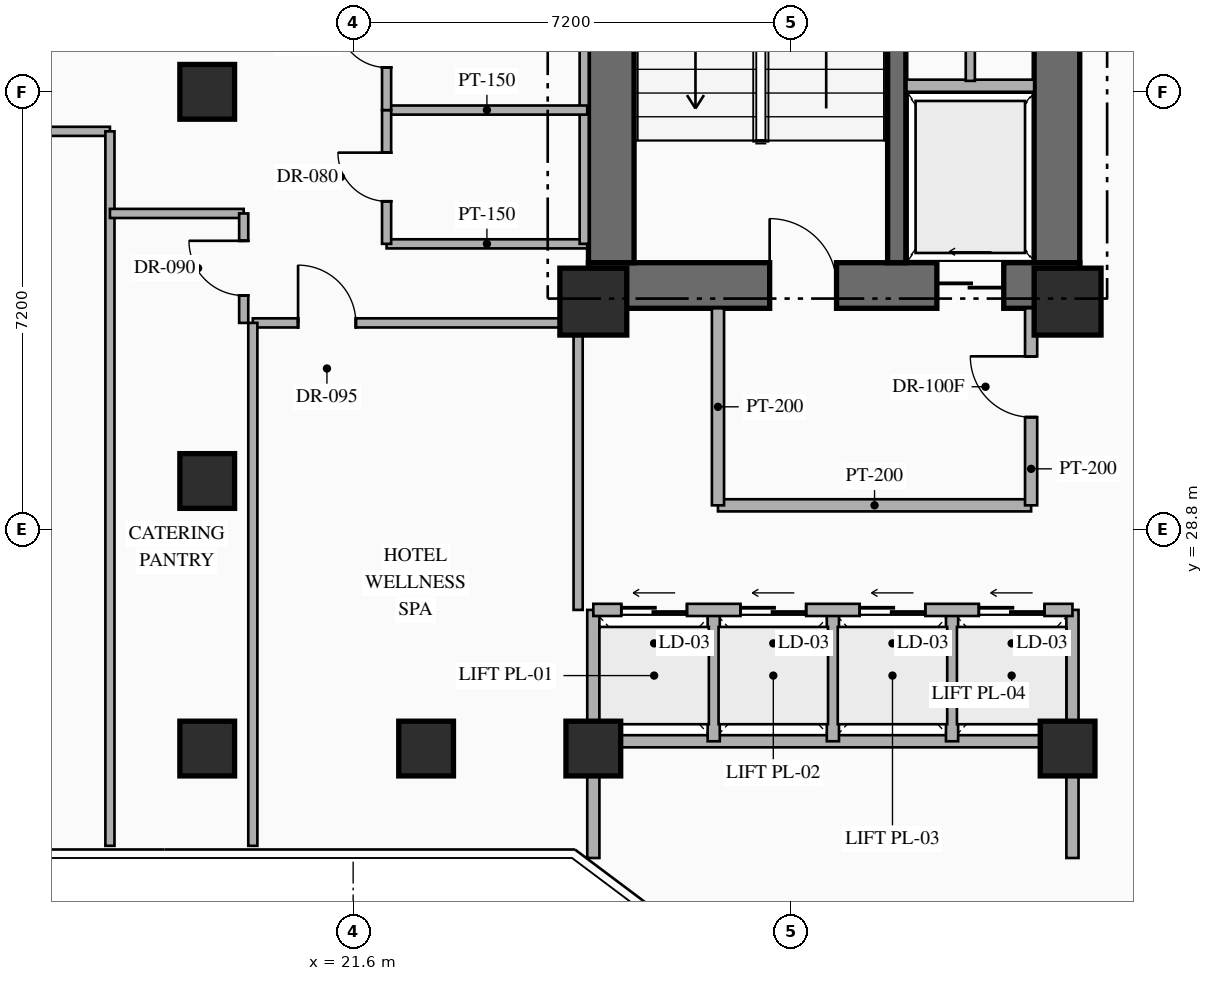
"""IFC4 building model, lengths in metres.
Left out: names, types, materials, properties, quantities, classifications, styles, units other than length and angle.
Written with IfcOpenShell. Run it as: python <this file> out.ifc"""

import sys

from ifc_helpers import new_model, si_unit, direction, frame, frame_2d, origin, origin_2d, place, context, subcontext, project, spatial, rectangle, hollow_rectangle, extrude, element, fill, save


model = new_model("IFC4")
c1 = context("Model", 3, precision=1e-05, world=origin(), true_north=direction((0.0, 1.0)))
c2 = subcontext(c1, "Body", "Model", "MODEL_VIEW")
j1 = project(units=[si_unit("LENGTHUNIT", "METRE"), si_unit("PLANEANGLEUNIT", "RADIAN")], contexts=[c1])
p1 = place(None, origin())
s1 = spatial("IfcSite", under=j1, at=p1, CompositionType="ELEMENT")
p2 = place(p1, origin())
s2 = spatial("IfcBuilding", under=s1, at=p2, CompositionType="ELEMENT")
p3 = place(p2, frame((0.0, 0.0, 84.65)))
s3 = spatial("IfcBuildingStorey", under=s2, at=p3, CompositionType="ELEMENT", Elevation=84.65)
p4 = place(p3, frame((25.47, 32.815, 0.0), z_axis=(0.0, 0.0, 1.0), x_axis=(1.0, 0.0, 0.0)))
e1 = element("IfcWall", 1, at=p4, inside=s3, PredefinedType="SHEAR", context=c2, shape_type="SweptSolid", body=[
    extrude(rectangle(XDim=8.08, YDim=0.75, at=frame_2d((4.04, 0.0))), origin(), (0.0, 0.0, 1.0), 3.35),
])
p5 = place(p4, frame((2.98, 0.0, 0.0)))
e2 = element("IfcOpeningElement", 2, at=p5, cuts=e1, PredefinedType="OPENING", context=c2, shape_type="SweptSolid", body=[
    extrude(rectangle(XDim=1.1, YDim=2.2, at=frame_2d((0.55, 1.1))), frame((0.0, 0.385, 0.0), z_axis=(0.0, -1.0, 0.0), x_axis=(1.0, 0.0, 0.0)), (0.0, 0.0, 1.0), 0.77),
])
p6 = place(p4, frame((5.73, 0.0, 0.0)))
e3 = element("IfcOpeningElement", 3, at=p6, cuts=e1, PredefinedType="OPENING", context=c2, shape_type="SweptSolid", body=[
    extrude(rectangle(XDim=1.1, YDim=2.15, at=frame_2d((0.55, 1.075))), frame((0.0, 0.385, 0.0), z_axis=(0.0, -1.0, 0.0), x_axis=(1.0, 0.0, 0.0)), (0.0, 0.0, 1.0), 0.77),
])
p7 = place(p3, frame((25.845, 33.19, 0.0), z_axis=(0.0, 0.0, 1.0), x_axis=(0.0, 1.0, 0.0)))
e4 = element("IfcWall", 4, at=p7, inside=s3, PredefinedType="SHEAR", context=c2, shape_type="SweptSolid", body=[
    extrude(rectangle(XDim=9.48, YDim=0.75, at=frame_2d((4.74, 0.0))), origin(), (0.0, 0.0, 1.0), 3.35),
])
p8 = place(p3, frame((33.175, 33.19, 0.0), z_axis=(0.0, 0.0, 1.0), x_axis=(0.0, 1.0, 0.0)))
e5 = element("IfcWall", 5, at=p8, inside=s3, PredefinedType="SHEAR", context=c2, shape_type="SweptSolid", body=[
    extrude(rectangle(XDim=9.48, YDim=0.75, at=frame_2d((4.74, 0.0))), origin(), (0.0, 0.0, 1.0), 3.35),
])
p9 = place(p8, frame((4.71, 0.0, 0.0)))
e6 = element("IfcOpeningElement", 6, at=p9, cuts=e5, PredefinedType="OPENING", context=c2, shape_type="SweptSolid", body=[
    extrude(rectangle(XDim=0.85, YDim=2.08, at=frame_2d((0.425, 1.04))), frame((0.0, 0.385, 0.0), z_axis=(0.0, -1.0, 0.0), x_axis=(1.0, 0.0, 0.0)), (0.0, 0.0, 1.0), 0.77),
])
p10 = place(p8, frame((7.76, 0.0, 0.0)))
e7 = element("IfcOpeningElement", 7, at=p10, cuts=e5, PredefinedType="OPENING", context=c2, shape_type="SweptSolid", body=[
    extrude(rectangle(XDim=0.85, YDim=2.08, at=frame_2d((0.425, 1.04))), frame((0.0, 0.385, 0.0), z_axis=(0.0, -1.0, 0.0), x_axis=(1.0, 0.0, 0.0)), (0.0, 0.0, 1.0), 0.77),
])
p11 = place(p3, frame((30.54, 33.19, 0.0), z_axis=(0.0, 0.0, 1.0), x_axis=(0.0, 1.0, 0.0)))
e8 = element("IfcWall", 8, at=p11, inside=s3, PredefinedType="SHEAR", context=c2, shape_type="SweptSolid", body=[
    extrude(rectangle(XDim=9.48, YDim=0.3, at=frame_2d((4.74, 0.0))), origin(), (0.0, 0.0, 1.0), 3.35),
])
for number, where, z_axis, x_axis in (
    (9, (25.55, 32.55, 0.0), (0.0, 0.0, 1.0), (1.0, 0.0, 0.0)),
    (10, (33.35, 32.55, 0.0), (0.0, 0.0, 1.0), (1.0, 0.0, 0.0)),
):
    element("IfcColumn", number, at=place(p3, frame(where, z_axis=z_axis, x_axis=x_axis)), inside=s3, PredefinedType="COLUMN", context=c2, shape_type="SweptSolid", body=[
        extrude(rectangle(XDim=1.1, YDim=1.1, at=origin_2d()), origin(), (0.0, 0.0, 1.0), 3.35),
    ])
for number, where, z_axis, x_axis in (
    (11, (25.55, 25.2, 0.0), (0.0, 0.0, 1.0), (1.0, 0.0, 0.0)),
    (12, (33.35, 25.2, 0.0), (0.0, 0.0, 1.0), (1.0, 0.0, 0.0)),
    (13, (19.2, 25.2, 0.0), (0.0, 0.0, 1.0), (1.0, 0.0, 0.0)),
    (14, (19.2, 29.6, 0.0), (0.0, 0.0, 1.0), (1.0, 0.0, 0.0)),
    (15, (22.8, 25.2, 0.0), (0.0, 0.0, 1.0), (1.0, 0.0, 0.0)),
    (16, (19.2, 36.0, 0.0), (0.0, 0.0, 1.0), (1.0, 0.0, 0.0)),
):
    element("IfcColumn", number, at=place(p3, frame(where, z_axis=z_axis, x_axis=x_axis)), inside=s3, PredefinedType="COLUMN", context=c2, shape_type="SweptSolid", body=[
        extrude(hollow_rectangle(XDim=0.9, YDim=0.9, WallThickness=0.036, at=origin_2d()), origin(), (0.0, 0.0, 1.0), 3.35),
    ])
p12 = place(p3, frame((30.7, 36.1, 0.0), z_axis=(0.0, 0.0, 1.0), x_axis=(1.0, 0.0, 0.0)))
e17 = element("IfcWall", 17, at=p12, inside=s3, PredefinedType="STANDARD", context=c2, shape_type="SweptSolid", body=[
    extrude(rectangle(XDim=2.1, YDim=0.2, at=frame_2d((1.05, 0.0))), origin(), (0.0, 0.0, 1.0), 3.13),
])
p13 = place(p3, frame((31.75, 36.18, 0.0), z_axis=(0.0, 0.0, 1.0), x_axis=(0.0, 1.0, 0.0)))
e18 = element("IfcWall", 18, at=p13, inside=s3, PredefinedType="PARTITIONING", context=c2, shape_type="SweptSolid", body=[
    extrude(rectangle(XDim=4.24, YDim=0.15, at=frame_2d((2.12, 0.0))), origin(), (0.0, 0.0, 1.0), 3.13),
])
p14 = place(p13, frame((1.695, 0.0, 0.0)))
e19 = element("IfcOpeningElement", 19, at=p14, cuts=e18, PredefinedType="OPENING", context=c2, shape_type="SweptSolid", body=[
    extrude(rectangle(XDim=0.85, YDim=2.08, at=frame_2d((0.425, 1.04))), frame((0.0, 0.085, 0.0), z_axis=(0.0, -1.0, 0.0), x_axis=(1.0, 0.0, 0.0)), (0.0, 0.0, 1.0), 0.17),
])
p15 = place(p3, frame((27.6, 29.2, 0.0), z_axis=(0.0, 0.0, 1.0), x_axis=(1.0, 0.0, 0.0)))
e20 = element("IfcWall", 20, at=p15, inside=s3, PredefinedType="STANDARD", context=c2, shape_type="SweptSolid", body=[
    extrude(rectangle(XDim=5.15, YDim=0.2, at=frame_2d((2.575, 0.0))), origin(), (0.0, 0.0, 1.0), 3.13),
])
p16 = place(p3, frame((27.6, 29.2, 0.0), z_axis=(0.0, 0.0, 1.0), x_axis=(0.0, 1.0, 0.0)))
e21 = element("IfcWall", 21, at=p16, inside=s3, PredefinedType="STANDARD", context=c2, shape_type="SweptSolid", body=[
    extrude(rectangle(XDim=3.24, YDim=0.2, at=frame_2d((1.62, 0.0))), origin(), (0.0, 0.0, 1.0), 3.13),
])
p17 = place(p3, frame((32.75, 29.2, 0.0), z_axis=(0.0, 0.0, 1.0), x_axis=(0.0, 1.0, 0.0)))
e22 = element("IfcWall", 22, at=p17, inside=s3, PredefinedType="STANDARD", context=c2, shape_type="SweptSolid", body=[
    extrude(rectangle(XDim=3.24, YDim=0.2, at=frame_2d((1.62, 0.0))), origin(), (0.0, 0.0, 1.0), 3.13),
])
p18 = place(p17, frame((1.45, 0.0, 0.0)))
e23 = element("IfcOpeningElement", 23, at=p18, cuts=e22, PredefinedType="OPENING", context=c2, shape_type="SweptSolid", body=[
    extrude(rectangle(XDim=1.0, YDim=2.2, at=frame_2d((0.5, 1.1))), frame((0.0, 0.11, 0.0), z_axis=(0.0, -1.0, 0.0), x_axis=(1.0, 0.0, 0.0)), (0.0, 0.0, 1.0), 0.22),
])
for number, where, z_axis, x_axis in (
    (24, (25.55, 23.4, 0.0), (0.0, 0.0, 1.0), (0.0, 1.0, 0.0)),
    (25, (33.43, 23.4, 0.0), (0.0, 0.0, 1.0), (0.0, 1.0, 0.0)),
):
    element("IfcWall", number, at=place(p3, frame(where, z_axis=z_axis, x_axis=x_axis)), inside=s3, PredefinedType="STANDARD", context=c2, shape_type="SweptSolid", body=[
        extrude(rectangle(XDim=4.08, YDim=0.2, at=frame_2d((2.04, 0.0))), origin(), (0.0, 0.0, 1.0), 2.425),
    ])
p19 = place(p3, frame((25.55, 25.32, 0.0), z_axis=(0.0, 0.0, 1.0), x_axis=(1.0, 0.0, 0.0)))
e26 = element("IfcWall", 26, at=p19, inside=s3, PredefinedType="STANDARD", context=c2, shape_type="SweptSolid", body=[
    extrude(rectangle(XDim=7.88, YDim=0.2, at=frame_2d((3.94, 0.0))), origin(), (0.0, 0.0, 1.0), 2.525),
])
for number, where, z_axis, x_axis in (
    (27, (27.53, 25.32, 0.0), (0.0, 0.0, 1.0), (0.0, 1.0, 0.0)),
    (28, (29.49, 25.32, 0.0), (0.0, 0.0, 1.0), (0.0, 1.0, 0.0)),
    (29, (31.45, 25.32, 0.0), (0.0, 0.0, 1.0), (0.0, 1.0, 0.0)),
):
    element("IfcWall", number, at=place(p3, frame(where, z_axis=z_axis, x_axis=x_axis)), inside=s3, PredefinedType="STANDARD", context=c2, shape_type="SweptSolid", body=[
        extrude(rectangle(XDim=2.16, YDim=0.2, at=frame_2d((1.08, 0.0))), origin(), (0.0, 0.0, 1.0), 3.13),
    ])
p20 = place(p3, frame((25.55, 27.48, 0.0), z_axis=(0.0, 0.0, 1.0), x_axis=(1.0, 0.0, 0.0)))
e30 = element("IfcWall", 30, at=p20, inside=s3, PredefinedType="STANDARD", context=c2, shape_type="SweptSolid", body=[
    extrude(rectangle(XDim=7.88, YDim=0.2, at=frame_2d((3.94, 0.0))), origin(), (0.0, 0.0, 1.0), 3.13),
])
p21 = place(p20, frame((0.46, 0.0, 0.0)))
e31 = element("IfcOpeningElement", 31, at=p21, cuts=e30, PredefinedType="OPENING", context=c2, shape_type="SweptSolid", body=[
    extrude(rectangle(XDim=1.08, YDim=2.15, at=frame_2d((0.54, 1.075))), frame((0.0, 0.11, 0.0), z_axis=(0.0, -1.0, 0.0), x_axis=(1.0, 0.0, 0.0)), (0.0, 0.0, 1.0), 0.22),
])
p22 = place(p20, frame((2.42, 0.0, 0.0)))
e32 = element("IfcOpeningElement", 32, at=p22, cuts=e30, PredefinedType="OPENING", context=c2, shape_type="SweptSolid", body=[
    extrude(rectangle(XDim=1.08, YDim=2.15, at=frame_2d((0.54, 1.075))), frame((0.0, 0.11, 0.0), z_axis=(0.0, -1.0, 0.0), x_axis=(1.0, 0.0, 0.0)), (0.0, 0.0, 1.0), 0.22),
])
p23 = place(p20, frame((4.38, 0.0, 0.0)))
e33 = element("IfcOpeningElement", 33, at=p23, cuts=e30, PredefinedType="OPENING", context=c2, shape_type="SweptSolid", body=[
    extrude(rectangle(XDim=1.08, YDim=2.15, at=frame_2d((0.54, 1.075))), frame((0.0, 0.11, 0.0), z_axis=(0.0, -1.0, 0.0), x_axis=(1.0, 0.0, 0.0)), (0.0, 0.0, 1.0), 0.22),
])
p24 = place(p20, frame((6.34, 0.0, 0.0)))
e34 = element("IfcOpeningElement", 34, at=p24, cuts=e30, PredefinedType="OPENING", context=c2, shape_type="SweptSolid", body=[
    extrude(rectangle(XDim=1.08, YDim=2.15, at=frame_2d((0.54, 1.075))), frame((0.0, 0.11, 0.0), z_axis=(0.0, -1.0, 0.0), x_axis=(1.0, 0.0, 0.0)), (0.0, 0.0, 1.0), 0.22),
])
p25 = place(p3, frame((22.15, 33.5, 0.0), z_axis=(0.0, 0.0, 1.0), x_axis=(1.0, 0.0, 0.0)))
e35 = element("IfcWall", 35, at=p25, inside=s3, PredefinedType="PARTITIONING", context=c2, shape_type="SweptSolid", body=[
    extrude(rectangle(XDim=3.3, YDim=0.15, at=frame_2d((1.65, 0.0))), origin(), (0.0, 0.0, 1.0), 3.13),
])
p26 = place(p3, frame((25.4, 33.5, 0.0), z_axis=(0.0, 0.0, 1.0), x_axis=(0.0, 1.0, 0.0)))
e36 = element("IfcWall", 36, at=p26, inside=s3, PredefinedType="PARTITIONING", context=c2, shape_type="SweptSolid", body=[
    extrude(rectangle(XDim=6.6, YDim=0.15, at=frame_2d((3.3, 0.0))), origin(), (0.0, 0.0, 1.0), 3.13),
])
p27 = place(p3, frame((22.15, 35.7, 0.0), z_axis=(0.0, 0.0, 1.0), x_axis=(1.0, 0.0, 0.0)))
e37 = element("IfcWall", 37, at=p27, inside=s3, PredefinedType="PARTITIONING", context=c2, shape_type="SweptSolid", body=[
    extrude(rectangle(XDim=3.3, YDim=0.15, at=frame_2d((1.65, 0.0))), origin(), (0.0, 0.0, 1.0), 3.13),
])
p28 = place(p3, frame((22.15, 33.5, 0.0), z_axis=(0.0, 0.0, 1.0), x_axis=(0.0, 1.0, 0.0)))
e38 = element("IfcWall", 38, at=p28, inside=s3, PredefinedType="PARTITIONING", context=c2, shape_type="SweptSolid", body=[
    extrude(rectangle(XDim=2.2, YDim=0.15, at=frame_2d((1.1, 0.0))), origin(), (0.0, 0.0, 1.0), 3.13),
])
p29 = place(p28, frame((0.7, 0.0, 0.0)))
e39 = element("IfcOpeningElement", 39, at=p29, cuts=e38, PredefinedType="OPENING", context=c2, shape_type="SweptSolid", body=[
    extrude(rectangle(XDim=0.8, YDim=2.06, at=frame_2d((0.4, 1.03))), frame((0.0, 0.085, 0.0), z_axis=(0.0, -1.0, 0.0), x_axis=(1.0, 0.0, 0.0)), (0.0, 0.0, 1.0), 0.17),
])
p30 = place(p3, frame((22.15, 35.7, 0.0), z_axis=(0.0, 0.0, 1.0), x_axis=(0.0, 1.0, 0.0)))
e40 = element("IfcWall", 40, at=p30, inside=s3, PredefinedType="PARTITIONING", context=c2, shape_type="SweptSolid", body=[
    extrude(rectangle(XDim=2.2, YDim=0.15, at=frame_2d((1.1, 0.0))), origin(), (0.0, 0.0, 1.0), 3.13),
])
p31 = place(p30, frame((0.7, 0.0, 0.0)))
e41 = element("IfcOpeningElement", 41, at=p31, cuts=e40, PredefinedType="OPENING", context=c2, shape_type="SweptSolid", body=[
    extrude(rectangle(XDim=0.8, YDim=2.06, at=frame_2d((0.4, 1.03))), frame((0.0, 0.085, 0.0), z_axis=(0.0, -1.0, 0.0), x_axis=(1.0, 0.0, 0.0)), (0.0, 0.0, 1.0), 0.17),
])
p32 = place(p3, frame((33.384, 17.312, 0.0), z_axis=(0.0, 0.0, 1.0), x_axis=(0.600008743659, 0.799993442181, 0.0)))
e42 = element("IfcWall", 42, at=p32, inside=s3, PredefinedType="PARTITIONING", context=c2, shape_type="SweptSolid", body=[
    extrude(rectangle(XDim=8.935, YDim=0.15, at=frame_2d((4.468, 0.0))), origin(), (0.0, 0.0, 1.0), 3.13),
])
p33 = place(p3, frame((19.95, 32.2, 0.0), z_axis=(0.0, 0.0, 1.0), x_axis=(1.0, 0.0, 0.0)))
e43 = element("IfcWall", 43, at=p33, inside=s3, PredefinedType="PARTITIONING", context=c2, shape_type="SweptSolid", body=[
    extrude(rectangle(XDim=5.35, YDim=0.15, at=frame_2d((2.675, 0.0))), origin(), (0.0, 0.0, 1.0), 3.13),
])
p34 = place(p33, frame((0.744, 0.0, 0.0)))
e44 = element("IfcOpeningElement", 44, at=p34, cuts=e43, PredefinedType="OPENING", context=c2, shape_type="SweptSolid", body=[
    extrude(rectangle(XDim=0.95, YDim=2.15, at=frame_2d((0.475, 1.075))), frame((0.0, 0.085, 0.0), z_axis=(0.0, -1.0, 0.0), x_axis=(1.0, 0.0, 0.0)), (0.0, 0.0, 1.0), 0.17),
])
p35 = place(p3, frame((19.95, 23.6, 0.0), z_axis=(0.0, 0.0, 1.0), x_axis=(0.0, 1.0, 0.0)))
e45 = element("IfcWall", 45, at=p35, inside=s3, PredefinedType="PARTITIONING", context=c2, shape_type="SweptSolid", body=[
    extrude(rectangle(XDim=8.6, YDim=0.15, at=frame_2d((4.3, 0.0))), origin(), (0.0, 0.0, 1.0), 3.13),
])
p36 = place(p3, frame((25.3, 27.48, 0.0), z_axis=(0.0, 0.0, 1.0), x_axis=(0.0, 1.0, 0.0)))
e46 = element("IfcWall", 46, at=p36, inside=s3, PredefinedType="PARTITIONING", context=c2, shape_type="SweptSolid", body=[
    extrude(rectangle(XDim=4.72, YDim=0.15, at=frame_2d((2.36, 0.0))), origin(), (0.0, 0.0, 1.0), 2.425),
])
p37 = place(p3, frame((11.75, 35.35, 0.0), z_axis=(0.0, 0.0, 1.0), x_axis=(1.0, 0.0, 0.0)))
e47 = element("IfcWall", 47, at=p37, inside=s3, PredefinedType="PARTITIONING", context=c2, shape_type="SweptSolid", body=[
    extrude(rectangle(XDim=5.85, YDim=0.15, at=frame_2d((2.925, 0.0))), origin(), (0.0, 0.0, 1.0), 3.13),
])
p38 = place(p37, frame((2.45, 0.0, 0.0)))
e48 = element("IfcOpeningElement", 48, at=p38, cuts=e47, PredefinedType="OPENING", context=c2, shape_type="SweptSolid", body=[
    extrude(rectangle(XDim=0.95, YDim=2.15, at=frame_2d((0.475, 1.075))), frame((0.0, 0.085, 0.0), z_axis=(0.0, -1.0, 0.0), x_axis=(1.0, 0.0, 0.0)), (0.0, 0.0, 1.0), 0.17),
])
p39 = place(p3, frame((17.6, 23.6, 0.0), z_axis=(0.0, 0.0, 1.0), x_axis=(0.0, 1.0, 0.0)))
e49 = element("IfcWall", 49, at=p39, inside=s3, PredefinedType="PARTITIONING", context=c2, shape_type="SweptSolid", body=[
    extrude(rectangle(XDim=11.75, YDim=0.15, at=frame_2d((5.875, 0.0))), origin(), (0.0, 0.0, 1.0), 3.13),
])
p40 = place(p3, frame((17.6, 34.0, 0.0), z_axis=(0.0, 0.0, 1.0), x_axis=(1.0, 0.0, 0.0)))
e50 = element("IfcWall", 50, at=p40, inside=s3, PredefinedType="PARTITIONING", context=c2, shape_type="SweptSolid", body=[
    extrude(rectangle(XDim=2.2, YDim=0.15, at=frame_2d((1.1, 0.0))), origin(), (0.0, 0.0, 1.0), 3.13),
])
p41 = place(p3, frame((19.8, 32.2, 0.0), z_axis=(0.0, 0.0, 1.0), x_axis=(0.0, 1.0, 0.0)))
e51 = element("IfcWall", 51, at=p41, inside=s3, PredefinedType="PARTITIONING", context=c2, shape_type="SweptSolid", body=[
    extrude(rectangle(XDim=1.8, YDim=0.15, at=frame_2d((0.9, 0.0))), origin(), (0.0, 0.0, 1.0), 3.13),
])
p42 = place(p41, frame((0.45, 0.0, 0.0)))
e52 = element("IfcOpeningElement", 52, at=p42, cuts=e51, PredefinedType="OPENING", context=c2, shape_type="SweptSolid", body=[
    extrude(rectangle(XDim=0.9, YDim=2.15, at=frame_2d((0.45, 1.075))), frame((0.0, 0.085, 0.0), z_axis=(0.0, -1.0, 0.0), x_axis=(1.0, 0.0, 0.0)), (0.0, 0.0, 1.0), 0.17),
])
p43 = place(p5, origin())
e53 = element("IfcDoor", 53, at=p43, inside=s3, OperationType="SINGLE_SWING_LEFT", PredefinedType="DOOR", context=c2, shape_type="SweptSolid", body=[
    extrude(rectangle(XDim=1.1, YDim=2.2, at=frame_2d((0.55, 1.1))), frame((0.0, 0.025, 0.0), z_axis=(0.0, -1.0, 0.0), x_axis=(1.0, 0.0, 0.0)), (0.0, 0.0, 1.0), 0.05),
])
fill(e2, e53)
p44 = place(p6, origin())
e54 = element("IfcDoor", 54, at=p44, inside=s3, OperationType="SLIDING_TO_LEFT", PredefinedType="USERDEFINED", context=c2, shape_type="SweptSolid", body=[
    extrude(rectangle(XDim=1.1, YDim=2.15, at=frame_2d((0.55, 1.075))), frame((0.0, 0.025, 0.0), z_axis=(0.0, -1.0, 0.0), x_axis=(1.0, 0.0, 0.0)), (0.0, 0.0, 1.0), 0.05),
])
fill(e3, e54)
p45 = place(p18, origin())
e55 = element("IfcDoor", 55, at=p45, inside=s3, OperationType="SINGLE_SWING_RIGHT", PredefinedType="DOOR", context=c2, shape_type="SweptSolid", body=[
    extrude(rectangle(XDim=1.0, YDim=2.2, at=frame_2d((0.5, 1.1))), frame((0.0, 0.025, 0.0), z_axis=(0.0, -1.0, 0.0), x_axis=(1.0, 0.0, 0.0)), (0.0, 0.0, 1.0), 0.05),
])
fill(e23, e55)
p46 = place(p21, origin())
e56 = element("IfcDoor", 56, at=p46, inside=s3, OperationType="SLIDING_TO_LEFT", PredefinedType="USERDEFINED", context=c2, shape_type="SweptSolid", body=[
    extrude(rectangle(XDim=1.08, YDim=2.15, at=frame_2d((0.54, 1.075))), frame((0.0, 0.025, 0.0), z_axis=(0.0, -1.0, 0.0), x_axis=(1.0, 0.0, 0.0)), (0.0, 0.0, 1.0), 0.05),
])
fill(e31, e56)
p47 = place(p22, origin())
e57 = element("IfcDoor", 57, at=p47, inside=s3, OperationType="SLIDING_TO_LEFT", PredefinedType="USERDEFINED", context=c2, shape_type="SweptSolid", body=[
    extrude(rectangle(XDim=1.08, YDim=2.15, at=frame_2d((0.54, 1.075))), frame((0.0, 0.025, 0.0), z_axis=(0.0, -1.0, 0.0), x_axis=(1.0, 0.0, 0.0)), (0.0, 0.0, 1.0), 0.05),
])
fill(e32, e57)
p48 = place(p23, origin())
e58 = element("IfcDoor", 58, at=p48, inside=s3, OperationType="SLIDING_TO_LEFT", PredefinedType="USERDEFINED", context=c2, shape_type="SweptSolid", body=[
    extrude(rectangle(XDim=1.08, YDim=2.15, at=frame_2d((0.54, 1.075))), frame((0.0, 0.025, 0.0), z_axis=(0.0, -1.0, 0.0), x_axis=(1.0, 0.0, 0.0)), (0.0, 0.0, 1.0), 0.05),
])
fill(e33, e58)
p49 = place(p24, origin())
e59 = element("IfcDoor", 59, at=p49, inside=s3, OperationType="SLIDING_TO_LEFT", PredefinedType="USERDEFINED", context=c2, shape_type="SweptSolid", body=[
    extrude(rectangle(XDim=1.08, YDim=2.15, at=frame_2d((0.54, 1.075))), frame((0.0, 0.025, 0.0), z_axis=(0.0, -1.0, 0.0), x_axis=(1.0, 0.0, 0.0)), (0.0, 0.0, 1.0), 0.05),
])
fill(e34, e59)
p50 = place(p29, origin())
e60 = element("IfcDoor", 60, at=p50, inside=s3, OperationType="SINGLE_SWING_RIGHT", PredefinedType="DOOR", context=c2, shape_type="SweptSolid", body=[
    extrude(rectangle(XDim=0.8, YDim=2.06, at=frame_2d((0.4, 1.03))), frame((0.0, 0.025, 0.0), z_axis=(0.0, -1.0, 0.0), x_axis=(1.0, 0.0, 0.0)), (0.0, 0.0, 1.0), 0.05),
])
fill(e39, e60)
p51 = place(p31, origin())
e61 = element("IfcDoor", 61, at=p51, inside=s3, OperationType="SINGLE_SWING_RIGHT", PredefinedType="DOOR", context=c2, shape_type="SweptSolid", body=[
    extrude(rectangle(XDim=0.8, YDim=2.06, at=frame_2d((0.4, 1.03))), frame((0.0, 0.025, 0.0), z_axis=(0.0, -1.0, 0.0), x_axis=(1.0, 0.0, 0.0)), (0.0, 0.0, 1.0), 0.05),
])
fill(e41, e61)
p52 = place(p34, origin())
e62 = element("IfcDoor", 62, at=p52, inside=s3, OperationType="SINGLE_SWING_LEFT", PredefinedType="DOOR", context=c2, shape_type="SweptSolid", body=[
    extrude(rectangle(XDim=0.95, YDim=2.15, at=frame_2d((0.475, 1.075))), frame((0.0, 0.025, 0.0), z_axis=(0.0, -1.0, 0.0), x_axis=(1.0, 0.0, 0.0)), (0.0, 0.0, 1.0), 0.05),
])
fill(e44, e62)
p53 = place(p42, origin())
e63 = element("IfcDoor", 63, at=p53, inside=s3, OperationType="SINGLE_SWING_RIGHT", PredefinedType="DOOR", context=c2, shape_type="SweptSolid", body=[
    extrude(rectangle(XDim=0.9, YDim=2.15, at=frame_2d((0.45, 1.075))), frame((0.0, 0.025, 0.0), z_axis=(0.0, -1.0, 0.0), x_axis=(1.0, 0.0, 0.0)), (0.0, 0.0, 1.0), 0.05),
])
fill(e52, e63)
save(model, sys.argv[1])
